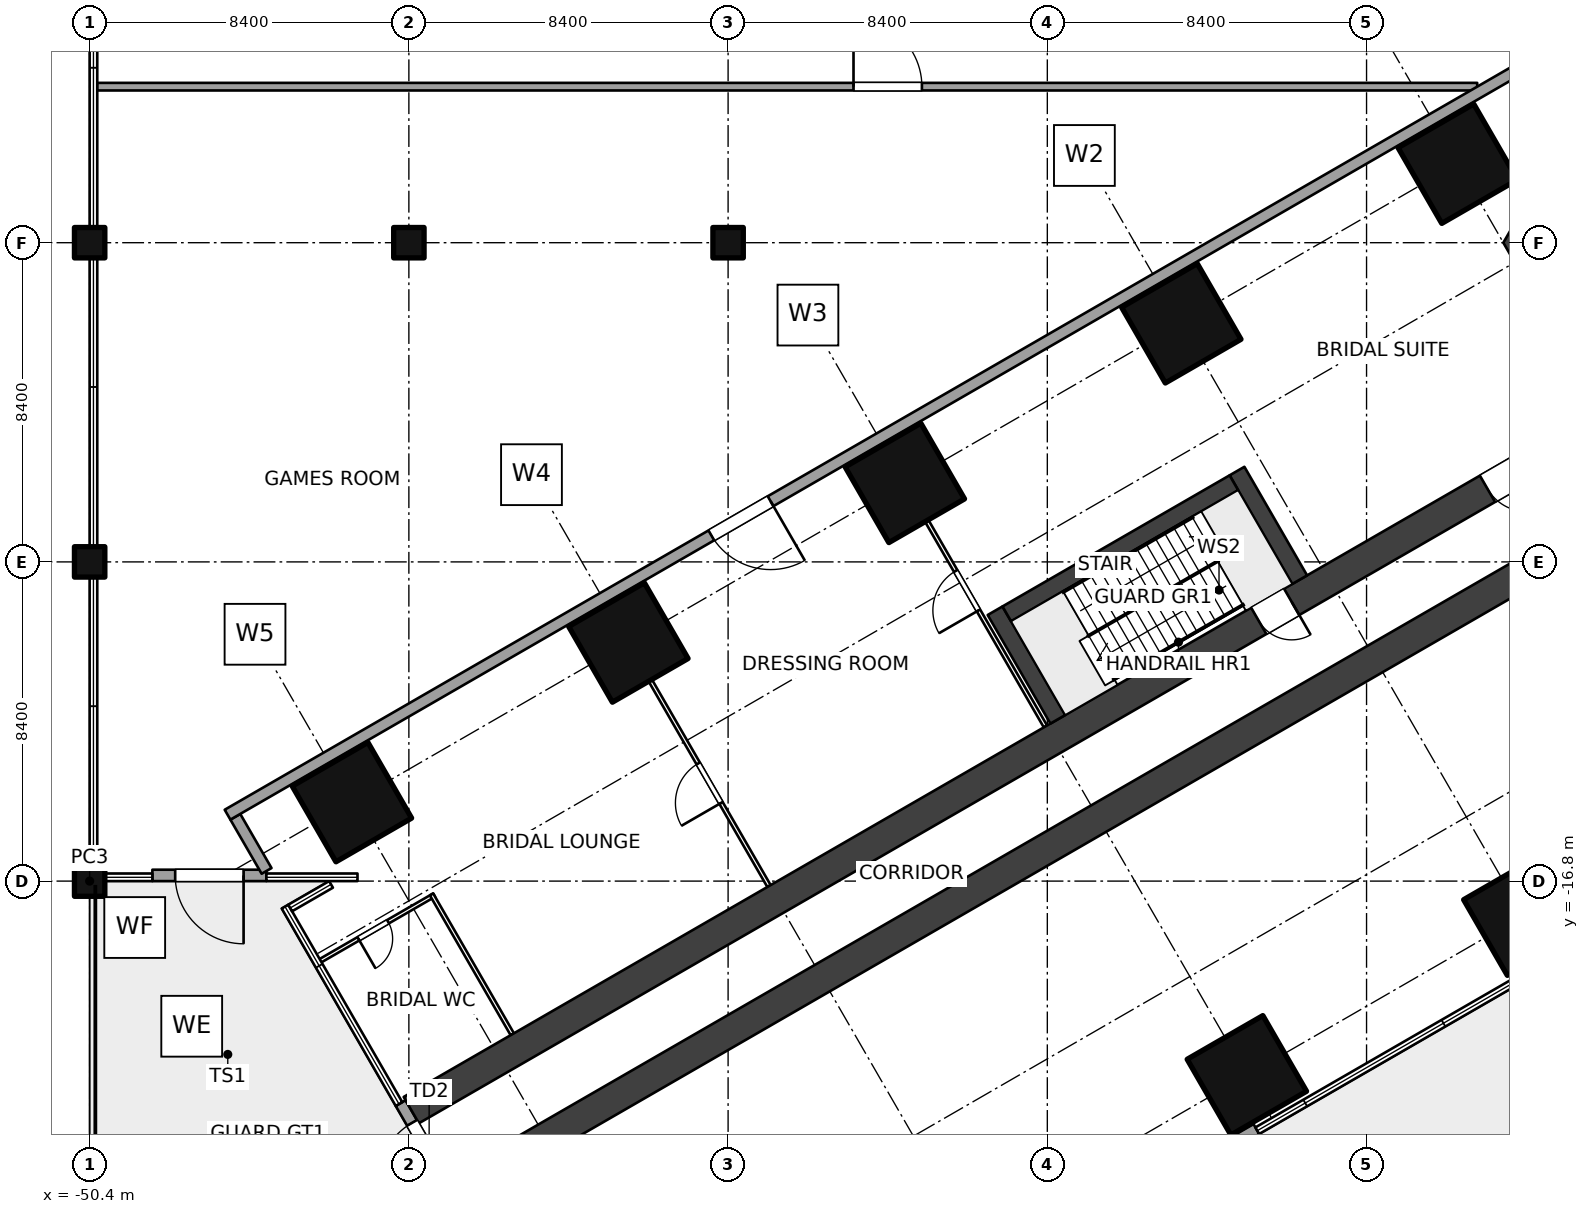
"""IFC4 building model, lengths in metres.
Left out: names, types, materials, properties, quantities, classifications, styles, units other than length and angle.
Written with IfcOpenShell. Run it as: python <this file> out.ifc"""

import sys

from ifc_helpers import new_model, si_unit, direction, frame, frame_2d, origin, origin_2d, place, context, subcontext, project, spatial, polyline, rectangle, outline, extrude, element, fill, save


model = new_model("IFC4")
c1 = context("Model", 3, precision=1e-05, world=origin(), true_north=direction((0.0, 1.0)))
c2 = subcontext(c1, "Body", "Model", "MODEL_VIEW")
j1 = project(units=[si_unit("LENGTHUNIT", "METRE"), si_unit("PLANEANGLEUNIT", "RADIAN")], contexts=[c1])
p1 = place(None, origin())
s1 = spatial("IfcSite", under=j1, at=p1, CompositionType="ELEMENT")
p2 = place(p1, origin())
s2 = spatial("IfcBuilding", under=s1, at=p2, CompositionType="ELEMENT")
p3 = place(p2, frame((0.0, 0.0, 16.0)))
s3 = spatial("IfcBuildingStorey", under=s2, at=p3, CompositionType="ELEMENT", Elevation=16.0)
for number, where, z_axis, x_axis in (
    (1, (-14.4, 2.078, 0.0), (0.0, 0.0, 1.0), (-0.5, 0.866, 0.0)),
    (2, (-12.675, -17.71, 0.0), (0.0, 0.0, 1.0), (-0.5, 0.866, 0.0)),
    (3, (-21.675, -2.122, 0.0), (0.0, 0.0, 1.0), (-0.5, 0.866, 0.0)),
    (4, (-19.949, -21.91, 0.0), (0.0, 0.0, 1.0), (-0.5, 0.866, 0.0)),
    (5, (-28.949, -6.322, 0.0), (0.0, 0.0, 1.0), (-0.5, 0.866, 0.0)),
    (6, (-36.224, -10.521, 0.0), (0.0, 0.0, 1.0), (-0.5, 0.866, 0.0)),
    (7, (-43.499, -14.721, 0.0), (0.0, 0.0, 1.0), (-0.5, 0.866, 0.0)),
):
    element("IfcColumn", number, at=place(p3, frame(where, z_axis=z_axis, x_axis=x_axis)), inside=s3, PredefinedType="COLUMN", context=c2, shape_type="SweptSolid", body=[
        extrude(rectangle(XDim=2.3, YDim=2.3, at=origin_2d()), origin(), (0.0, 0.0, 1.0), 5.0),
    ])
for number, where, z_axis, x_axis in (
    (8, (-50.4, -16.8, 0.0), (0.0, 0.0, 1.0), (1.0, 0.0, 0.0)),
    (9, (-50.4, -8.4, 0.0), (0.0, 0.0, 1.0), (1.0, 0.0, 0.0)),
    (10, (-50.4, 0.0, 0.0), (0.0, 0.0, 1.0), (1.0, 0.0, 0.0)),
    (11, (-42.0, 0.0, 0.0), (0.0, 0.0, 1.0), (1.0, 0.0, 0.0)),
    (12, (-33.6, 0.0, 0.0), (0.0, 0.0, 1.0), (1.0, 0.0, 0.0)),
):
    element("IfcColumn", number, at=place(p3, frame(where, z_axis=z_axis, x_axis=x_axis)), inside=s3, PredefinedType="COLUMN", context=c2, shape_type="SweptSolid", body=[
        extrude(rectangle(XDim=0.8, YDim=0.8, at=origin_2d()), origin(), (0.0, 0.0, 1.0), 5.0),
    ])
p4 = place(p3, origin())
e13 = element("IfcWall", 13, at=p4, inside=s3, PredefinedType="SHEAR", context=c2, shape_type="SweptSolid", body=[
    extrude(outline(polyline([(-6.6, 11.432), (-13.2, 0.0), (-12.94, -0.45), (-12.161, 0.0), (-6.08, 10.531), (-6.08, 11.432), (-6.6, 11.432)])), origin(), (0.0, 0.0, 1.0), 5.0),
])
p5 = place(p3, frame((-8.91, -6.53, 0.0), z_axis=(0.0, 0.0, 1.0), x_axis=(-0.866025284237, -0.500000207062, 0.0)))
e14 = element("IfcWall", 14, at=p5, inside=s3, PredefinedType="SHEAR", context=c2, shape_type="SweptSolid", body=[
    extrude(rectangle(XDim=36.75, YDim=0.8, at=frame_2d((18.375, 0.0))), origin(), (0.0, 0.0, 1.0), 5.0),
])
p6 = place(p5, frame((1.35, 0.0, 0.0)))
e15 = element("IfcOpeningElement", 15, at=p6, cuts=e14, PredefinedType="OPENING", context=c2, shape_type="SweptSolid", body=[
    extrude(rectangle(XDim=1.2, YDim=2.1, at=frame_2d((0.6, 1.05))), frame((0.0, 0.41, 0.0), z_axis=(0.0, -1.0, 0.0), x_axis=(1.0, 0.0, 0.0)), (0.0, 0.0, 1.0), 0.82),
])
p7 = place(p3, frame((-10.11, -4.451, 0.0), z_axis=(0.0, 0.0, 1.0), x_axis=(-0.866025284237, -0.500000207062, 0.0)))
e16 = element("IfcWall", 16, at=p7, inside=s3, PredefinedType="SHEAR", context=c2, shape_type="SweptSolid", body=[
    extrude(rectangle(XDim=36.75, YDim=0.8, at=frame_2d((18.375, 0.0))), origin(), (0.0, 0.0, 1.0), 5.0),
])
p8 = place(p7, frame((10.0, 0.0, 0.0)))
e17 = element("IfcOpeningElement", 17, at=p8, cuts=e16, PredefinedType="OPENING", context=c2, shape_type="SweptSolid", body=[
    extrude(rectangle(XDim=1.0, YDim=2.1, at=frame_2d((0.5, 1.05))), frame((0.0, 0.41, 0.0), z_axis=(0.0, -1.0, 0.0), x_axis=(1.0, 0.0, 0.0)), (0.0, 0.0, 1.0), 0.82),
])
p9 = place(p7, frame((2.85, 0.0, 0.0)))
e18 = element("IfcOpeningElement", 18, at=p9, cuts=e16, PredefinedType="OPENING", context=c2, shape_type="SweptSolid", body=[
    extrude(rectangle(XDim=1.2, YDim=2.1, at=frame_2d((0.6, 1.05))), frame((0.0, 0.41, 0.0), z_axis=(0.0, -1.0, 0.0), x_axis=(1.0, 0.0, 0.0)), (0.0, 0.0, 1.0), 0.82),
])
p10 = place(p3, frame((-40.717, -25.24, 0.0), z_axis=(0.0, 0.0, 1.0), x_axis=(-0.50002537861, 0.866010750942, 0.0)))
e19 = element("IfcWall", 19, at=p10, inside=s3, PredefinedType="SOLIDWALL", context=c2, shape_type="SweptSolid", body=[
    extrude(rectangle(XDim=3.0, YDim=0.3, at=frame_2d((1.5, 0.0))), origin(), (0.0, 0.0, 1.0), 4.7),
])
p11 = place(p10, frame((0.6, 0.0, 0.0)))
e20 = element("IfcOpeningElement", 20, at=p11, cuts=e19, PredefinedType="OPENING", context=c2, shape_type="SweptSolid", body=[
    extrude(rectangle(XDim=1.8, YDim=2.4, at=frame_2d((0.9, 1.2))), frame((0.0, 0.16, 0.0), z_axis=(0.0, -1.0, 0.0), x_axis=(1.0, 0.0, 0.0)), (0.0, 0.0, 1.0), 0.32),
])
p12 = place(p3, frame((-45.749, -16.65, 0.0), z_axis=(0.0, 0.0, 1.0), x_axis=(-1.0, 0.0, 0.0)))
e21 = element("IfcWall", 21, at=p12, inside=s3, PredefinedType="SOLIDWALL", context=c2, shape_type="SweptSolid", body=[
    extrude(rectangle(XDim=3.0, YDim=0.3, at=frame_2d((1.5, 0.0))), origin(), (0.0, 0.0, 1.0), 4.7),
])
p13 = place(p12, frame((0.6, 0.0, 0.0)))
e22 = element("IfcOpeningElement", 22, at=p13, cuts=e21, PredefinedType="OPENING", context=c2, shape_type="SweptSolid", body=[
    extrude(rectangle(XDim=1.8, YDim=2.4, at=frame_2d((0.9, 1.2))), frame((0.0, 0.16, 0.0), z_axis=(0.0, -1.0, 0.0), x_axis=(1.0, 0.0, 0.0)), (0.0, 0.0, 1.0), 0.32),
])
p14 = place(p3, frame((-19.699, -23.325, 0.0), z_axis=(0.0, 0.0, 1.0), x_axis=(-0.866031096941, -0.499990139034, 0.0)))
e23 = element("IfcWall", 23, at=p14, inside=s3, PredefinedType="SOLIDWALL", context=c2, shape_type="SweptSolid", body=[
    extrude(rectangle(XDim=3.0, YDim=0.3, at=frame_2d((1.5, 0.0))), origin(), (0.0, 0.0, 1.0), 4.7),
])
p15 = place(p14, frame((0.6, 0.0, 0.0)))
e24 = element("IfcOpeningElement", 24, at=p15, cuts=e23, PredefinedType="OPENING", context=c2, shape_type="SweptSolid", body=[
    extrude(rectangle(XDim=1.8, YDim=2.4, at=frame_2d((0.9, 1.2))), frame((0.0, 0.16, 0.0), z_axis=(0.0, -1.0, 0.0), x_axis=(1.0, 0.0, 0.0)), (0.0, 0.0, 1.0), 0.32),
])
p16 = place(p3, frame((-25.249, -12.73, 0.0), z_axis=(0.0, 0.0, 1.0), x_axis=(-0.499987320047, 0.866032724435, 0.0)))
e25 = element("IfcWall", 25, at=p16, inside=s3, PredefinedType="PARTITIONING", context=c2, shape_type="SweptSolid", body=[
    extrude(rectangle(XDim=6.25, YDim=0.1, at=frame_2d((3.125, 0.0))), origin(), (0.0, 0.0, 1.0), 2.9),
])
p17 = place(p16, frame((3.525, 0.0, 0.0)))
e26 = element("IfcOpeningElement", 26, at=p17, cuts=e25, PredefinedType="OPENING", context=c2, shape_type="SweptSolid", body=[
    extrude(rectangle(XDim=1.2, YDim=2.1, at=frame_2d((0.6, 1.05))), frame((0.0, 0.06, 0.0), z_axis=(0.0, -1.0, 0.0), x_axis=(1.0, 0.0, 0.0)), (0.0, 0.0, 1.0), 0.12),
])
p18 = place(p3, frame((-32.524, -16.93, 0.0), z_axis=(0.0, 0.0, 1.0), x_axis=(-0.500004234368, 0.866022959057, 0.0)))
e27 = element("IfcWall", 27, at=p18, inside=s3, PredefinedType="PARTITIONING", context=c2, shape_type="SweptSolid", body=[
    extrude(rectangle(XDim=6.25, YDim=0.1, at=frame_2d((3.125, 0.0))), origin(), (0.0, 0.0, 1.0), 2.9),
])
p19 = place(p18, frame((2.525, 0.0, 0.0)))
e28 = element("IfcOpeningElement", 28, at=p19, cuts=e27, PredefinedType="OPENING", context=c2, shape_type="SweptSolid", body=[
    extrude(rectangle(XDim=1.2, YDim=2.1, at=frame_2d((0.6, 1.05))), frame((0.0, 0.06, 0.0), z_axis=(0.0, -1.0, 0.0), x_axis=(1.0, 0.0, 0.0)), (0.0, 0.0, 1.0), 0.12),
])
p20 = place(p3, frame((-41.335, -17.168, 0.0), z_axis=(0.0, 0.0, 1.0), x_axis=(-0.866020032806, -0.500009302692, 0.0)))
e29 = element("IfcWall", 29, at=p20, inside=s3, PredefinedType="PARTITIONING", context=c2, shape_type="SweptSolid", body=[
    extrude(rectangle(XDim=3.487, YDim=0.1, at=frame_2d((1.744, 0.0))), origin(), (0.0, 0.0, 1.0), 4.7),
])
p21 = place(p20, frame((1.4, 0.0, 0.0)))
e30 = element("IfcOpeningElement", 30, at=p21, cuts=e29, PredefinedType="OPENING", context=c2, shape_type="SweptSolid", body=[
    extrude(rectangle(XDim=0.9, YDim=2.1, at=frame_2d((0.45, 1.05))), frame((0.0, 0.06, 0.0), z_axis=(0.0, -1.0, 0.0), x_axis=(1.0, 0.0, 0.0)), (0.0, 0.0, 1.0), 0.12),
])
p22 = place(p3, frame((-39.279, -20.83, 0.0), z_axis=(0.0, 0.0, 1.0), x_axis=(-0.499994284652, 0.866028703517, 0.0)))
e31 = element("IfcWall", 31, at=p22, inside=s3, PredefinedType="PARTITIONING", context=c2, shape_type="SweptSolid", body=[
    extrude(rectangle(XDim=4.25, YDim=0.1, at=frame_2d((2.125, 0.0))), origin(), (0.0, 0.0, 1.0), 2.9),
])
p23 = place(p3, frame((-50.207, 4.106, 0.0), z_axis=(0.0, 0.0, 1.0), x_axis=(1.0, 0.0, 0.0)))
e32 = element("IfcWall", 32, at=p23, inside=s3, PredefinedType="SOLIDWALL", context=c2, shape_type="SweptSolid", body=[
    extrude(rectangle(XDim=36.319, YDim=0.2, at=frame_2d((18.159, 0.0))), origin(), (0.0, 0.0, 1.0), 4.7),
])
p24 = place(p23, frame((19.907, 0.0, 0.0)))
e33 = element("IfcOpeningElement", 33, at=p24, cuts=e32, PredefinedType="OPENING", context=c2, shape_type="SweptSolid", body=[
    extrude(rectangle(XDim=1.8, YDim=2.4, at=frame_2d((0.9, 1.2))), frame((0.0, 0.11, 0.0), z_axis=(0.0, -1.0, 0.0), x_axis=(1.0, 0.0, 0.0)), (0.0, 0.0, 1.0), 0.22),
])
p25 = place(p3, frame((-45.744, -16.532, 0.0), z_axis=(0.0, 0.0, 1.0), x_axis=(-0.50001794124, 0.866015045157, 0.0)))
e34 = element("IfcWall", 34, at=p25, inside=s3, PredefinedType="SOLIDWALL", context=c2, shape_type="SweptSolid", body=[
    extrude(rectangle(XDim=1.645, YDim=0.3, at=frame_2d((0.823, 0.0))), origin(), (0.0, 0.0, 1.0), 4.7),
])
p26 = place(p3, frame((-9.45, 6.495, 0.0), z_axis=(0.0, 0.0, 1.0), x_axis=(-0.866025301493, -0.500000177174, 0.0)))
e35 = element("IfcWall", 35, at=p26, inside=s3, PredefinedType="SOLIDWALL", context=c2, shape_type="SweptSolid", body=[
    extrude(rectangle(XDim=43.095, YDim=0.3, at=frame_2d((21.548, 0.0))), origin(), (0.0, 0.0, 1.0), 4.7),
])
p27 = place(p26, frame((26.595, 0.0, 0.0)))
e36 = element("IfcOpeningElement", 36, at=p27, cuts=e35, PredefinedType="OPENING", context=c2, shape_type="SweptSolid", body=[
    extrude(rectangle(XDim=1.8, YDim=2.4, at=frame_2d((0.9, 1.2))), frame((0.0, 0.16, 0.0), z_axis=(0.0, -1.0, 0.0), x_axis=(1.0, 0.0, 0.0)), (0.0, 0.0, 1.0), 0.32),
])
for number, where, z_axis, x_axis in (
    (37, (-18.559, -8.868, 0.0), (0.0, 0.0, 1.0), (-0.5, 0.866, 0.0)),
    (38, (-24.925, -12.543, 0.0), (0.0, 0.0, 1.0), (-0.5, 0.866, 0.0)),
):
    element("IfcWall", number, at=place(p3, frame(where, z_axis=z_axis, x_axis=x_axis)), inside=s3, PredefinedType="SOLIDWALL", context=c2, shape_type="SweptSolid", body=[
        extrude(rectangle(XDim=3.3, YDim=0.45, at=frame_2d((1.65, 0.0))), origin(), (0.0, 0.0, 1.0), 5.0),
    ])
p28 = place(p3, frame((-20.292, -6.317, 0.0), z_axis=(0.0, 0.0, 1.0), x_axis=(-0.866028853923, -0.499994024137, 0.0)))
e39 = element("IfcWall", 39, at=p28, inside=s3, PredefinedType="SOLIDWALL", context=c2, shape_type="SweptSolid", body=[
    extrude(rectangle(XDim=6.9, YDim=0.45, at=frame_2d((3.45, 0.0))), origin(), (0.0, 0.0, 1.0), 5.0),
])
p29 = place(p11, origin())
e40 = element("IfcDoor", 40, at=p29, inside=s3, OperationType="DOUBLE_DOOR_SINGLE_SWING", PredefinedType="DOOR", context=c2, shape_type="SweptSolid", body=[
    extrude(rectangle(XDim=1.8, YDim=2.4, at=frame_2d((0.9, 1.2))), frame((0.0, 0.025, 0.0), z_axis=(0.0, -1.0, 0.0), x_axis=(1.0, 0.0, 0.0)), (0.0, 0.0, 1.0), 0.05),
])
fill(e20, e40)
p30 = place(p13, origin())
e41 = element("IfcDoor", 41, at=p30, inside=s3, OperationType="DOUBLE_DOOR_SINGLE_SWING", PredefinedType="DOOR", context=c2, shape_type="SweptSolid", body=[
    extrude(rectangle(XDim=1.8, YDim=2.4, at=frame_2d((0.9, 1.2))), frame((0.0, 0.025, 0.0), z_axis=(0.0, -1.0, 0.0), x_axis=(1.0, 0.0, 0.0)), (0.0, 0.0, 1.0), 0.05),
])
fill(e22, e41)
p31 = place(p8, origin())
e42 = element("IfcDoor", 42, at=p31, inside=s3, OperationType="SINGLE_SWING_LEFT", PredefinedType="DOOR", context=c2, shape_type="SweptSolid", body=[
    extrude(rectangle(XDim=1.0, YDim=2.1, at=frame_2d((0.5, 1.05))), frame((0.0, 0.025, 0.0), z_axis=(0.0, -1.0, 0.0), x_axis=(1.0, 0.0, 0.0)), (0.0, 0.0, 1.0), 0.05),
])
fill(e17, e42)
p32 = place(p17, origin())
e43 = element("IfcDoor", 43, at=p32, inside=s3, OperationType="DOUBLE_SWING_LEFT", PredefinedType="DOOR", context=c2, shape_type="SweptSolid", body=[
    extrude(rectangle(XDim=1.2, YDim=2.1, at=frame_2d((0.6, 1.05))), frame((0.0, 0.025, 0.0), z_axis=(0.0, -1.0, 0.0), x_axis=(1.0, 0.0, 0.0)), (0.0, 0.0, 1.0), 0.05),
])
fill(e26, e43)
p33 = place(p19, origin())
e44 = element("IfcDoor", 44, at=p33, inside=s3, OperationType="DOUBLE_SWING_LEFT", PredefinedType="DOOR", context=c2, shape_type="SweptSolid", body=[
    extrude(rectangle(XDim=1.2, YDim=2.1, at=frame_2d((0.6, 1.05))), frame((0.0, 0.025, 0.0), z_axis=(0.0, -1.0, 0.0), x_axis=(1.0, 0.0, 0.0)), (0.0, 0.0, 1.0), 0.05),
])
fill(e28, e44)
p34 = place(p21, origin())
e45 = element("IfcDoor", 45, at=p34, inside=s3, OperationType="SINGLE_SWING_RIGHT", PredefinedType="DOOR", context=c2, shape_type="SweptSolid", body=[
    extrude(rectangle(XDim=0.9, YDim=2.1, at=frame_2d((0.45, 1.05))), frame((0.0, 0.025, 0.0), z_axis=(0.0, -1.0, 0.0), x_axis=(1.0, 0.0, 0.0)), (0.0, 0.0, 1.0), 0.05),
])
fill(e30, e45)
p35 = place(p9, origin())
e46 = element("IfcDoor", 46, at=p35, inside=s3, OperationType="DOUBLE_SWING_LEFT", PredefinedType="DOOR", context=c2, shape_type="SweptSolid", body=[
    extrude(rectangle(XDim=1.2, YDim=2.1, at=frame_2d((0.6, 1.05))), frame((0.0, 0.025, 0.0), z_axis=(0.0, -1.0, 0.0), x_axis=(1.0, 0.0, 0.0)), (0.0, 0.0, 1.0), 0.05),
])
fill(e18, e46)
p36 = place(p24, origin())
e47 = element("IfcDoor", 47, at=p36, inside=s3, OperationType="DOUBLE_DOOR_DOUBLE_SWING", PredefinedType="DOOR", context=c2, shape_type="SweptSolid", body=[
    extrude(rectangle(XDim=1.8, YDim=2.4, at=frame_2d((0.9, 1.2))), frame((0.0, 0.025, 0.0), z_axis=(0.0, -1.0, 0.0), x_axis=(1.0, 0.0, 0.0)), (0.0, 0.0, 1.0), 0.05),
])
fill(e33, e47)
p37 = place(p27, origin())
e48 = element("IfcDoor", 48, at=p37, inside=s3, OperationType="DOUBLE_DOOR_DOUBLE_SWING", PredefinedType="DOOR", context=c2, shape_type="SweptSolid", body=[
    extrude(rectangle(XDim=1.8, YDim=2.4, at=frame_2d((0.9, 1.2))), frame((0.0, 0.025, 0.0), z_axis=(0.0, -1.0, 0.0), x_axis=(1.0, 0.0, 0.0)), (0.0, 0.0, 1.0), 0.05),
])
fill(e36, e48)
save(model, sys.argv[1])
